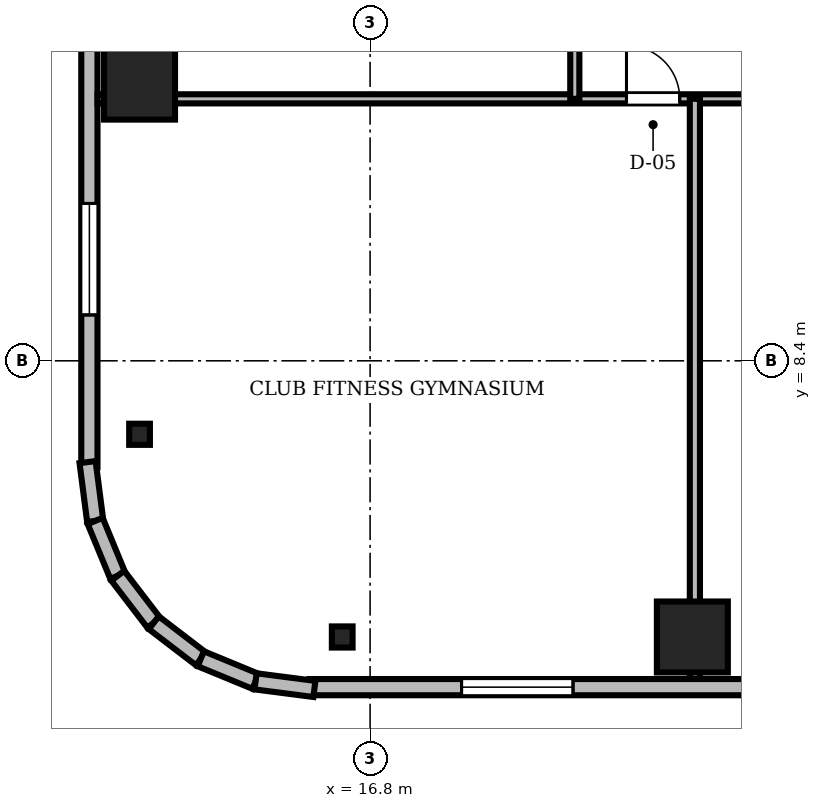
"""IFC4 building model, lengths in metres.
Left out: names, types, materials, properties, quantities, classifications, styles, units other than length and angle.
Written with IfcOpenShell. Run it as: python <this file> out.ifc"""

import sys

from ifc_helpers import new_model, si_unit, direction, frame, frame_2d, origin, origin_2d, place, context, subcontext, project, spatial, rectangle, i_section, extrude, source, transform, mapped, element, fill, save


model = new_model("IFC4")
c1 = context("Model", 3, precision=1e-05, world=origin(), true_north=direction((0.0, 1.0)))
c2 = subcontext(c1, "Body", "Model", "MODEL_VIEW")
j1 = project(units=[si_unit("LENGTHUNIT", "METRE"), si_unit("PLANEANGLEUNIT", "RADIAN")], contexts=[c1])
p1 = place(None, origin())
s1 = spatial("IfcSite", under=j1, at=p1, CompositionType="ELEMENT")
p2 = place(p1, origin())
s2 = spatial("IfcBuilding", under=s1, at=p2, CompositionType="ELEMENT")
p3 = place(p2, frame((0.0, 0.0, 222.3)))
s3 = spatial("IfcBuildingStorey", under=s2, at=p3, CompositionType="ELEMENT", Elevation=222.3)
m1 = source(origin(), c2, "Body", "SweptSolid", [
    extrude(rectangle(XDim=1.4, YDim=1.4, at=origin_2d()), origin(), (0.0, 0.0, 1.0), 3.53),
])
for number, where, z_axis, x_axis in (
    (1, (23.16, 2.95, 0.0), (0.0, 0.0, 1.0), (1.0, 0.0, 0.0)),
    (2, (12.25, 13.86, 0.0), (0.0, 0.0, 1.0), (1.0, 0.0, 0.0)),
):
    element("IfcColumn", number, at=place(p3, frame(where, z_axis=z_axis, x_axis=x_axis)), inside=s3, PredefinedType="COLUMN", context=c2, shape_type="MappedRepresentation", body=[
        mapped(m1, transform((0.0, 0.0, 0.0), scale=1.0)),
    ])
m2 = source(origin(), c2, "Body", "SweptSolid", [
    extrude(i_section(OverallWidth=0.409, OverallDepth=0.417, WebThickness=0.021, FlangeThickness=0.033, FilletRadius=0.015, at=origin_2d()), origin(), (0.0, 0.0, 1.0), 3.53),
])
for number, where, z_axis, x_axis in (
    (3, (16.25, 2.95, 0.0), (0.0, 0.0, 1.0), (1.0, 0.0, 0.0)),
    (4, (12.25, 6.95, 0.0), (0.0, 0.0, 1.0), (1.0, 0.0, 0.0)),
):
    element("IfcColumn", number, at=place(p3, frame(where, z_axis=z_axis, x_axis=x_axis)), inside=s3, PredefinedType="COLUMN", context=c2, shape_type="MappedRepresentation", body=[
        mapped(m2, transform((0.0, 0.0, 0.0), scale=1.0)),
    ])
m3 = source(origin(), c2, "Body", "SweptSolid", [
    extrude(rectangle(XDim=15.6, YDim=0.32, at=frame_2d((7.8, 0.0))), origin(), (0.0, 0.0, 1.0), 3.53),
])
p4 = place(p3, frame((15.6, 1.96, 0.0), z_axis=(0.0, 0.0, 1.0), x_axis=(1.0, 0.0, 0.0)))
e5 = element("IfcWall", 5, at=p4, inside=s3, PredefinedType="SOLIDWALL", context=c2, shape_type="MappedRepresentation", body=[
    mapped(m3, transform((0.0, 0.0, 0.0), scale=1.0)),
])
m4 = source(origin(), c2, "Body", "SweptSolid", [
    extrude(rectangle(XDim=2.2, YDim=2.4, at=frame_2d((1.1, 1.2))), frame((0.0, 0.17, 0.0), z_axis=(0.0, -1.0, 0.0), x_axis=(1.0, 0.0, 0.0)), (0.0, 0.0, 1.0), 0.34),
])
p5 = place(p4, frame((3.005, 0.0, 0.72)))
e6 = element("IfcOpeningElement", 6, at=p5, cuts=e5, PredefinedType="OPENING", context=c2, shape_type="MappedRepresentation", body=[
    mapped(m4, transform((0.0, 0.0, 0.0), scale=1.0)),
])
p6 = place(p3, frame((11.26, 21.9, 0.0), z_axis=(0.0, 0.0, 1.0), x_axis=(0.0, -1.0, 0.0)))
e7 = element("IfcWall", 7, at=p6, inside=s3, PredefinedType="SOLIDWALL", context=c2, shape_type="MappedRepresentation", body=[
    mapped(m3, transform((0.0, 0.0, 0.0), scale=1.0)),
])
m5 = source(origin(), c2, "Body", "SweptSolid", [
    extrude(rectangle(XDim=1.4, YDim=2.3, at=frame_2d((0.7, 1.15))), frame((0.0, 0.17, 0.0), z_axis=(0.0, -1.0, 0.0), x_axis=(1.0, 0.0, 0.0)), (0.0, 0.0, 1.0), 0.34),
])
p7 = place(p6, frame((4.59, 0.0, 0.0)))
e8 = element("IfcOpeningElement", 8, at=p7, cuts=e7, PredefinedType="OPENING", context=c2, shape_type="MappedRepresentation", body=[
    mapped(m5, transform((0.0, 0.0, 0.0), scale=1.0)),
])
p8 = place(p6, frame((10.395, 0.0, 0.72)))
e9 = element("IfcOpeningElement", 9, at=p8, cuts=e7, PredefinedType="OPENING", context=c2, shape_type="MappedRepresentation", body=[
    mapped(m4, transform((0.0, 0.0, 0.0), scale=1.0)),
])
m6 = source(origin(), c2, "Body", "SweptSolid", [
    extrude(rectangle(XDim=1.171, YDim=0.32, at=frame_2d((0.585, 0.0))), origin(), (0.0, 0.0, 1.0), 3.53),
])
p9 = place(p3, frame((11.224, 6.401, 0.0), z_axis=(0.0, 0.0, 1.0), x_axis=(0.128269133229, -0.991739395941, 0.0)))
e10 = element("IfcWall", 10, at=p9, inside=s3, PredefinedType="SOLIDWALL", context=c2, shape_type="MappedRepresentation", body=[
    mapped(m6, transform((0.0, 0.0, 0.0), scale=1.0)),
])
m7 = source(origin(), c2, "Body", "SweptSolid", [
    extrude(rectangle(XDim=1.169, YDim=0.32, at=frame_2d((0.584, 0.0))), origin(), (0.0, 0.0, 1.0), 3.53),
])
for number, where, z_axis, x_axis in (
    (11, (11.375, 5.24, 0.0), (0.0, 0.0, 1.0), (0.381, -0.925, 0.0)),
    (12, (11.82, 4.159, 0.0), (0.0, 0.0, 1.0), (0.608, -0.794, 0.0)),
):
    element("IfcWall", number, at=place(p3, frame(where, z_axis=z_axis, x_axis=x_axis)), inside=s3, PredefinedType="SOLIDWALL", context=c2, shape_type="MappedRepresentation", body=[
        mapped(m7, transform((0.0, 0.0, 0.0), scale=1.0)),
    ])
m8 = source(origin(), c2, "Body", "SweptSolid", [
    extrude(rectangle(XDim=1.169, YDim=0.32, at=frame_2d((0.584, 0.0))), origin(), (0.0, 0.0, 1.0), 3.53),
])
p10 = place(p3, frame((12.531, 3.231, 0.0), z_axis=(0.0, 0.0, 1.0), x_axis=(0.793663520347, -0.608356981114, 0.0)))
e13 = element("IfcWall", 13, at=p10, inside=s3, PredefinedType="SOLIDWALL", context=c2, shape_type="MappedRepresentation", body=[
    mapped(m8, transform((0.0, 0.0, 0.0), scale=1.0)),
])
m9 = source(origin(), c2, "Body", "SweptSolid", [
    extrude(rectangle(XDim=1.169, YDim=0.32, at=frame_2d((0.585, 0.0))), origin(), (0.0, 0.0, 1.0), 3.53),
])
p11 = place(p3, frame((13.459, 2.52, 0.0), z_axis=(0.0, 0.0, 1.0), x_axis=(0.924479075121, -0.381232789334, 0.0)))
e14 = element("IfcWall", 14, at=p11, inside=s3, PredefinedType="SOLIDWALL", context=c2, shape_type="MappedRepresentation", body=[
    mapped(m9, transform((0.0, 0.0, 0.0), scale=1.0)),
])
m10 = source(origin(), c2, "Body", "SweptSolid", [
    extrude(rectangle(XDim=1.17, YDim=0.32, at=frame_2d((0.585, 0.0))), origin(), (0.0, 0.0, 1.0), 3.53),
])
p12 = place(p3, frame((14.54, 2.074, 0.0), z_axis=(0.0, 0.0, 1.0), x_axis=(0.991762485493, -0.128090485085, 0.0)))
e15 = element("IfcWall", 15, at=p12, inside=s3, PredefinedType="SOLIDWALL", context=c2, shape_type="MappedRepresentation", body=[
    mapped(m10, transform((0.0, 0.0, 0.0), scale=1.0)),
])
m11 = source(origin(), c2, "Body", "SweptSolid", [
    extrude(rectangle(XDim=46.156, YDim=0.18, at=frame_2d((23.078, 0.0))), origin(), (0.0, 0.0, 1.0), 2.772),
])
p13 = place(p3, frame((11.422, 13.57, 0.0), z_axis=(0.0, 0.0, 1.0), x_axis=(1.0, 0.0, 0.0)))
e16 = element("IfcWall", 16, at=p13, inside=s3, PredefinedType="PARTITIONING", context=c2, shape_type="MappedRepresentation", body=[
    mapped(m11, transform((0.0, 0.0, 0.0), scale=1.0)),
])
m12 = source(origin(), c2, "Body", "SweptSolid", [
    extrude(rectangle(XDim=1.05, YDim=2.2, at=frame_2d((0.525, 1.1))), frame((0.0, 0.1, 0.0), z_axis=(0.0, -1.0, 0.0), x_axis=(1.0, 0.0, 0.0)), (0.0, 0.0, 1.0), 0.2),
])
p14 = place(p13, frame((10.438, 0.0, 0.0)))
e17 = element("IfcOpeningElement", 17, at=p14, cuts=e16, PredefinedType="OPENING", context=c2, shape_type="MappedRepresentation", body=[
    mapped(m12, transform((0.0, 0.0, 0.0), scale=1.0)),
])
p15 = place(p13, frame((12.993, 0.0, 0.0)))
e18 = element("IfcOpeningElement", 18, at=p15, cuts=e16, PredefinedType="OPENING", context=c2, shape_type="MappedRepresentation", body=[
    mapped(m12, transform((0.0, 0.0, 0.0), scale=1.0)),
])
p16 = place(p13, frame((16.443, 0.0, 0.0)))
e19 = element("IfcOpeningElement", 19, at=p16, cuts=e16, PredefinedType="OPENING", context=c2, shape_type="MappedRepresentation", body=[
    mapped(m12, transform((0.0, 0.0, 0.0), scale=1.0)),
])
p17 = place(p13, frame((20.121, 0.0, 0.0)))
e20 = element("IfcOpeningElement", 20, at=p17, cuts=e16, PredefinedType="OPENING", context=c2, shape_type="MappedRepresentation", body=[
    mapped(m12, transform((0.0, 0.0, 0.0), scale=1.0)),
])
p18 = place(p13, frame((24.124, 0.0, 0.0)))
e21 = element("IfcOpeningElement", 21, at=p18, cuts=e16, PredefinedType="OPENING", context=c2, shape_type="MappedRepresentation", body=[
    mapped(m12, transform((0.0, 0.0, 0.0), scale=1.0)),
])
p19 = place(p13, frame((29.261, 0.0, 0.0)))
e22 = element("IfcOpeningElement", 22, at=p19, cuts=e16, PredefinedType="OPENING", context=c2, shape_type="MappedRepresentation", body=[
    mapped(m12, transform((0.0, 0.0, 0.0), scale=1.0)),
])
p20 = place(p13, frame((34.113, 0.0, 0.0)))
e23 = element("IfcOpeningElement", 23, at=p20, cuts=e16, PredefinedType="OPENING", context=c2, shape_type="MappedRepresentation", body=[
    mapped(m12, transform((0.0, 0.0, 0.0), scale=1.0)),
])
p21 = place(p13, frame((37.498, 0.0, 0.0)))
e24 = element("IfcOpeningElement", 24, at=p21, cuts=e16, PredefinedType="OPENING", context=c2, shape_type="MappedRepresentation", body=[
    mapped(m12, transform((0.0, 0.0, 0.0), scale=1.0)),
])
m13 = source(origin(), c2, "Body", "SweptSolid", [
    extrude(rectangle(XDim=14.98, YDim=0.18, at=frame_2d((7.49, 0.0))), origin(), (0.0, 0.0, 1.0), 2.972),
])
p22 = place(p3, frame((20.84, 13.57, 0.0), z_axis=(0.0, 0.0, 1.0), x_axis=(0.0, 1.0, 0.0)))
e25 = element("IfcWall", 25, at=p22, inside=s3, PredefinedType="PARTITIONING", context=c2, shape_type="MappedRepresentation", body=[
    mapped(m13, transform((0.0, 0.0, 0.0), scale=1.0)),
])
p23 = place(p22, frame((1.952, 0.0, 0.0)))
e26 = element("IfcOpeningElement", 26, at=p23, cuts=e25, PredefinedType="OPENING", context=c2, shape_type="MappedRepresentation", body=[
    mapped(m12, transform((0.0, 0.0, 0.0), scale=1.0)),
])
m14 = source(origin(), c2, "Body", "SweptSolid", [
    extrude(rectangle(XDim=0.95, YDim=2.15, at=frame_2d((0.475, 1.075))), frame((0.0, 0.1, 0.0), z_axis=(0.0, -1.0, 0.0), x_axis=(1.0, 0.0, 0.0)), (0.0, 0.0, 1.0), 0.2),
])
p24 = place(p22, frame((8.12, 0.0, 0.0)))
e27 = element("IfcOpeningElement", 27, at=p24, cuts=e25, PredefinedType="OPENING", context=c2, shape_type="MappedRepresentation", body=[
    mapped(m14, transform((0.0, 0.0, 0.0), scale=1.0)),
])
p25 = place(p22, frame((11.838, 0.0, 0.0)))
e28 = element("IfcOpeningElement", 28, at=p25, cuts=e25, PredefinedType="OPENING", context=c2, shape_type="MappedRepresentation", body=[
    mapped(m12, transform((0.0, 0.0, 0.0), scale=1.0)),
])
m15 = source(origin(), c2, "Body", "SweptSolid", [
    extrude(rectangle(XDim=11.448, YDim=0.2, at=frame_2d((5.724, 0.0))), origin(), (0.0, 0.0, 1.0), 2.772),
])
p26 = place(p3, frame((23.21, 2.122, 0.0), z_axis=(0.0, 0.0, 1.0), x_axis=(0.0, 1.0, 0.0)))
e29 = element("IfcWall", 29, at=p26, inside=s3, PredefinedType="PARTITIONING", context=c2, shape_type="MappedRepresentation", body=[
    mapped(m15, transform((0.0, 0.0, 0.0), scale=1.0)),
])
m16 = source(origin(), c2, "Body", "SweptSolid", [
    extrude(rectangle(XDim=2.2, YDim=2.4, at=frame_2d((1.1, 1.2))), frame((0.0, 0.03, 0.0), z_axis=(0.0, -1.0, 0.0), x_axis=(1.0, 0.0, 0.0)), (0.0, 0.0, 1.0), 0.06),
])
p27 = place(p5, origin())
e30 = element("IfcWindow", 30, at=p27, inside=s3, PartitioningType="SINGLE_PANEL", PredefinedType="WINDOW", context=c2, shape_type="MappedRepresentation", body=[
    mapped(m16, transform((0.0, 0.0, 0.0), scale=1.0)),
])
fill(e6, e30)
p28 = place(p8, origin())
e31 = element("IfcWindow", 31, at=p28, inside=s3, PartitioningType="SINGLE_PANEL", PredefinedType="WINDOW", context=c2, shape_type="MappedRepresentation", body=[
    mapped(m16, transform((0.0, 0.0, 0.0), scale=1.0)),
])
fill(e9, e31)
m17 = source(origin(), c2, "Body", "SweptSolid", [
    extrude(rectangle(XDim=1.05, YDim=2.2, at=frame_2d((0.525, 1.1))), frame((0.0, 0.025, 0.0), z_axis=(0.0, -1.0, 0.0), x_axis=(1.0, 0.0, 0.0)), (0.0, 0.0, 1.0), 0.05),
])
p29 = place(p14, origin())
e32 = element("IfcDoor", 32, at=p29, inside=s3, OperationType="SINGLE_SWING_LEFT", PredefinedType="DOOR", context=c2, shape_type="MappedRepresentation", body=[
    mapped(m17, transform((0.0, 0.0, 0.0), scale=1.0)),
])
fill(e17, e32)
save(model, sys.argv[1])
